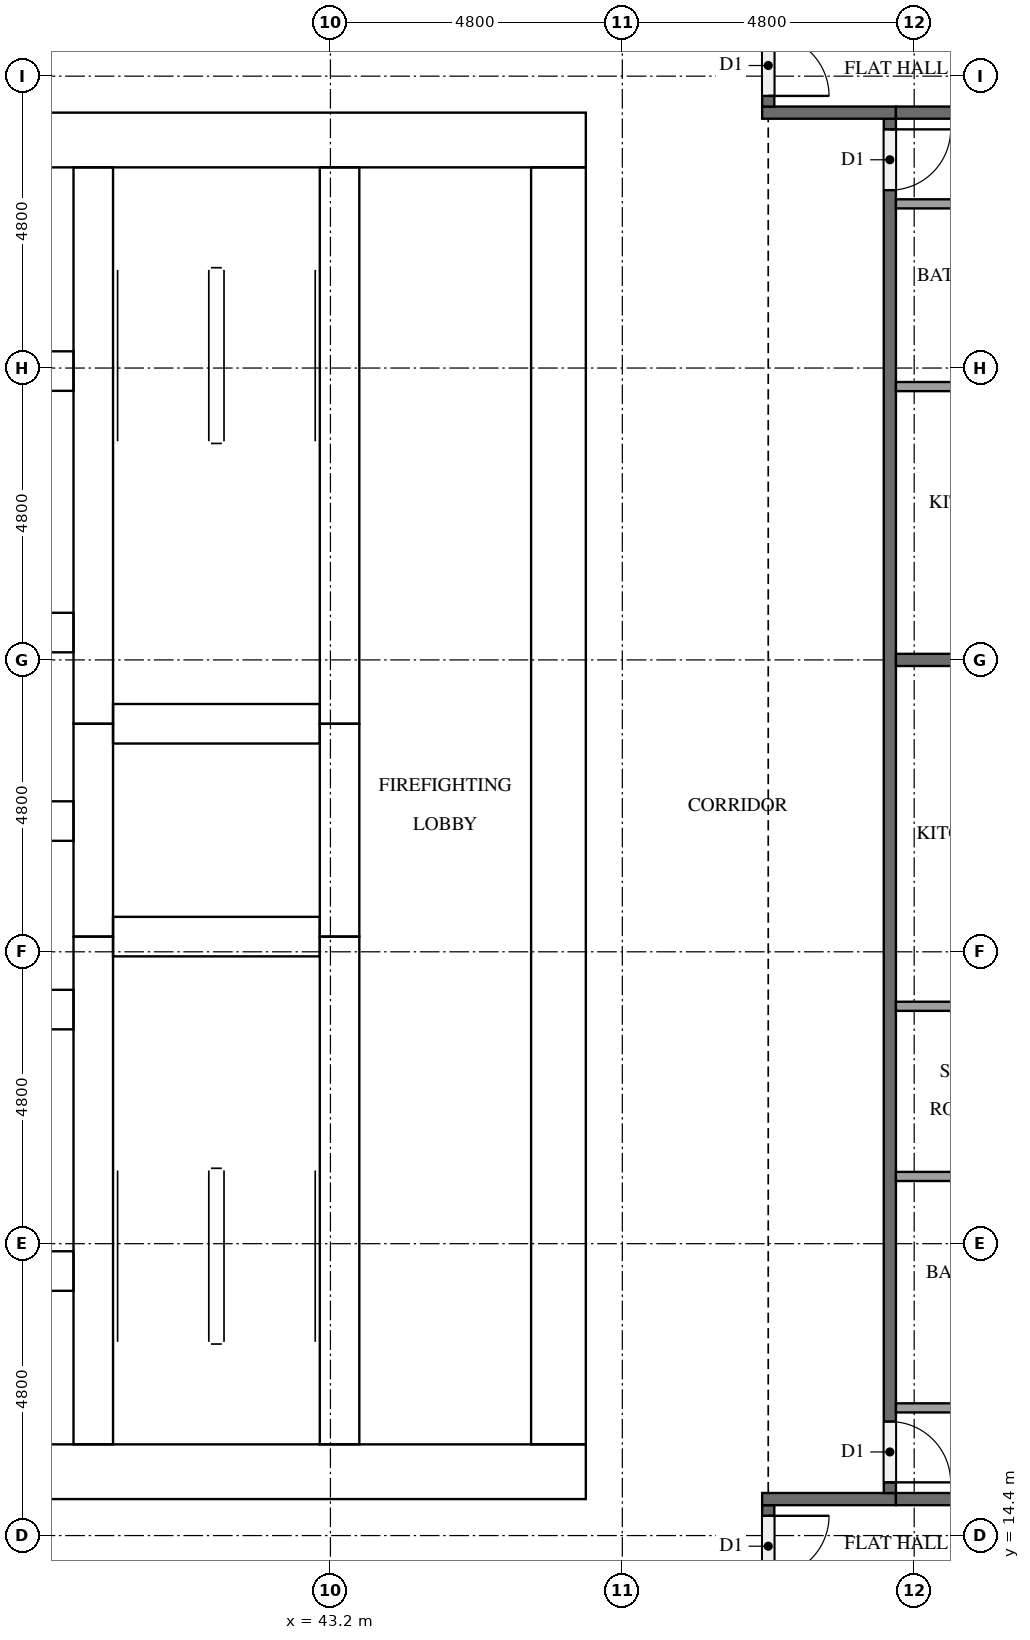
"""IFC4 building model, lengths in metres.
Left out: names, types, materials, properties, quantities, classifications, styles, units other than length and angle.
Written with IfcOpenShell. Run it as: python <this file> out.ifc"""

import sys

from ifc_helpers import new_model, si_unit, direction, frame, frame_2d, origin, place, context, subcontext, project, spatial, rectangle, extrude, element, fill, save


model = new_model("IFC4")
c1 = context("Model", 3, precision=1e-05, world=origin(), true_north=direction((0.0, 1.0)))
c2 = subcontext(c1, "Body", "Model", "MODEL_VIEW")
j1 = project(units=[si_unit("LENGTHUNIT", "METRE"), si_unit("PLANEANGLEUNIT", "RADIAN")], contexts=[c1])
p1 = place(None, origin())
s1 = spatial("IfcSite", under=j1, at=p1, CompositionType="ELEMENT")
p2 = place(p1, origin())
s2 = spatial("IfcBuilding", under=s1, at=p2, CompositionType="ELEMENT")
p3 = place(p2, frame((0.0, 0.0, 89.2)))
s3 = spatial("IfcBuildingStorey", under=s2, at=p3, CompositionType="ELEMENT", Elevation=89.2)
p4 = place(p3, frame((15.0, 15.45, 0.0), z_axis=(0.0, 0.0, 1.0), x_axis=(1.0, 0.0, 0.0)))
e1 = element("IfcWall", 1, at=p4, inside=s3, PredefinedType="SHEAR", context=c2, shape_type="SweptSolid", body=[
    extrude(rectangle(XDim=32.4, YDim=0.9, at=frame_2d((16.2, 0.0))), origin(), (0.0, 0.0, 1.0), 3.2),
])
p5 = place(p4, frame((15.3, 0.0, 0.0)))
e2 = element("IfcOpeningElement", 2, at=p5, cuts=e1, PredefinedType="OPENING", context=c2, shape_type="SweptSolid", body=[
    extrude(rectangle(XDim=1.8, YDim=2.1, at=frame_2d((0.9, 1.05))), frame((0.0, 0.46, 0.0), z_axis=(0.0, -1.0, 0.0), x_axis=(1.0, 0.0, 0.0)), (0.0, 0.0, 1.0), 0.92),
])
p6 = place(p3, frame((15.0, 37.35, 0.0), z_axis=(0.0, 0.0, 1.0), x_axis=(1.0, 0.0, 0.0)))
e3 = element("IfcWall", 3, at=p6, inside=s3, PredefinedType="SHEAR", context=c2, shape_type="SweptSolid", body=[
    extrude(rectangle(XDim=32.4, YDim=0.9, at=frame_2d((16.2, 0.0))), origin(), (0.0, 0.0, 1.0), 3.2),
])
p7 = place(p6, frame((15.3, 0.0, 0.0)))
e4 = element("IfcOpeningElement", 4, at=p7, cuts=e3, PredefinedType="OPENING", context=c2, shape_type="SweptSolid", body=[
    extrude(rectangle(XDim=1.8, YDim=2.1, at=frame_2d((0.9, 1.05))), frame((0.0, 0.46, 0.0), z_axis=(0.0, -1.0, 0.0), x_axis=(1.0, 0.0, 0.0)), (0.0, 0.0, 1.0), 0.92),
])
p8 = place(p6, frame((1.794, 0.0, 0.0)))
e5 = element("IfcOpeningElement", 5, at=p8, cuts=e3, PredefinedType="OPENING", context=c2, shape_type="SweptSolid", body=[
    extrude(rectangle(XDim=1.0, YDim=2.1, at=frame_2d((0.5, 1.05))), frame((0.0, 0.46, 0.0), z_axis=(0.0, -1.0, 0.0), x_axis=(1.0, 0.0, 0.0)), (0.0, 0.0, 1.0), 0.92),
])
p9 = place(p6, frame((5.331, 0.0, 0.0)))
e6 = element("IfcOpeningElement", 6, at=p9, cuts=e3, PredefinedType="OPENING", context=c2, shape_type="SweptSolid", body=[
    extrude(rectangle(XDim=1.0, YDim=2.1, at=frame_2d((0.5, 1.05))), frame((0.0, 0.46, 0.0), z_axis=(0.0, -1.0, 0.0), x_axis=(1.0, 0.0, 0.0)), (0.0, 0.0, 1.0), 0.92),
])
p10 = place(p3, frame((46.95, 15.9, 0.0), z_axis=(0.0, 0.0, 1.0), x_axis=(0.0, 1.0, 0.0)))
e7 = element("IfcWall", 7, at=p10, inside=s3, PredefinedType="SHEAR", context=c2, shape_type="SweptSolid", body=[
    extrude(rectangle(XDim=21.0, YDim=0.9, at=frame_2d((10.5, 0.0))), origin(), (0.0, 0.0, 1.0), 3.2),
])
p11 = place(p10, frame((10.2, 0.0, 0.0)))
e8 = element("IfcOpeningElement", 8, at=p11, cuts=e7, PredefinedType="OPENING", context=c2, shape_type="SweptSolid", body=[
    extrude(rectangle(XDim=1.2, YDim=2.1, at=frame_2d((0.6, 1.05))), frame((0.0, 0.46, 0.0), z_axis=(0.0, -1.0, 0.0), x_axis=(1.0, 0.0, 0.0)), (0.0, 0.0, 1.0), 0.92),
])
p12 = place(p3, frame((39.3, 15.9, 0.0), z_axis=(0.0, 0.0, 1.0), x_axis=(0.0, 1.0, 0.0)))
e9 = element("IfcWall", 9, at=p12, inside=s3, PredefinedType="SHEAR", context=c2, shape_type="SweptSolid", body=[
    extrude(rectangle(XDim=8.35, YDim=0.65, at=frame_2d((4.175, 0.0))), origin(), (0.0, 0.0, 1.0), 3.2),
])
p13 = place(p3, frame((39.3, 24.25, 0.0), z_axis=(0.0, 0.0, 1.0), x_axis=(0.0, 1.0, 0.0)))
e10 = element("IfcWall", 10, at=p13, inside=s3, PredefinedType="SHEAR", context=c2, shape_type="SweptSolid", body=[
    extrude(rectangle(XDim=3.5, YDim=0.65, at=frame_2d((1.75, 0.0))), origin(), (0.0, 0.0, 1.0), 3.2),
])
p14 = place(p3, frame((39.3, 27.75, 0.0), z_axis=(0.0, 0.0, 1.0), x_axis=(0.0, 1.0, 0.0)))
e11 = element("IfcWall", 11, at=p14, inside=s3, PredefinedType="SHEAR", context=c2, shape_type="SweptSolid", body=[
    extrude(rectangle(XDim=9.15, YDim=0.65, at=frame_2d((4.575, 0.0))), origin(), (0.0, 0.0, 1.0), 3.2),
])
p15 = place(p3, frame((43.35, 15.9, 0.0), z_axis=(0.0, 0.0, 1.0), x_axis=(0.0, 1.0, 0.0)))
e12 = element("IfcWall", 12, at=p15, inside=s3, PredefinedType="SHEAR", context=c2, shape_type="SweptSolid", body=[
    extrude(rectangle(XDim=8.35, YDim=0.65, at=frame_2d((4.175, 0.0))), origin(), (0.0, 0.0, 1.0), 3.2),
])
p16 = place(p15, frame((0.3, 0.0, 0.0)))
e13 = element("IfcOpeningElement", 13, at=p16, cuts=e12, PredefinedType="OPENING", context=c2, shape_type="SweptSolid", body=[
    extrude(rectangle(XDim=1.2, YDim=2.1, at=frame_2d((0.6, 1.05))), frame((0.0, 0.335, 0.0), z_axis=(0.0, -1.0, 0.0), x_axis=(1.0, 0.0, 0.0)), (0.0, 0.0, 1.0), 0.67),
])
p17 = place(p3, frame((43.35, 24.25, 0.0), z_axis=(0.0, 0.0, 1.0), x_axis=(0.0, 1.0, 0.0)))
e14 = element("IfcWall", 14, at=p17, inside=s3, PredefinedType="SHEAR", context=c2, shape_type="SweptSolid", body=[
    extrude(rectangle(XDim=3.5, YDim=0.65, at=frame_2d((1.75, 0.0))), origin(), (0.0, 0.0, 1.0), 3.2),
])
p18 = place(p17, frame((1.2, 0.0, 0.0)))
e15 = element("IfcOpeningElement", 15, at=p18, cuts=e14, PredefinedType="OPENING", context=c2, shape_type="SweptSolid", body=[
    extrude(rectangle(XDim=1.1, YDim=2.1, at=frame_2d((0.55, 1.05))), frame((0.0, 0.335, 0.0), z_axis=(0.0, -1.0, 0.0), x_axis=(1.0, 0.0, 0.0)), (0.0, 0.0, 1.0), 0.67),
])
p19 = place(p3, frame((43.35, 27.75, 0.0), z_axis=(0.0, 0.0, 1.0), x_axis=(0.0, 1.0, 0.0)))
e16 = element("IfcWall", 16, at=p19, inside=s3, PredefinedType="SHEAR", context=c2, shape_type="SweptSolid", body=[
    extrude(rectangle(XDim=9.15, YDim=0.65, at=frame_2d((4.575, 0.0))), origin(), (0.0, 0.0, 1.0), 3.2),
])
p20 = place(p19, frame((7.65, 0.0, 0.0)))
e17 = element("IfcOpeningElement", 17, at=p20, cuts=e16, PredefinedType="OPENING", context=c2, shape_type="SweptSolid", body=[
    extrude(rectangle(XDim=1.2, YDim=2.1, at=frame_2d((0.6, 1.05))), frame((0.0, 0.335, 0.0), z_axis=(0.0, -1.0, 0.0), x_axis=(1.0, 0.0, 0.0)), (0.0, 0.0, 1.0), 0.67),
])
for number, where, z_axis, x_axis in (
    (18, (39.625, 24.25, 0.0), (0.0, 0.0, 1.0), (1.0, 0.0, 0.0)),
    (19, (39.625, 27.75, 0.0), (0.0, 0.0, 1.0), (1.0, 0.0, 0.0)),
):
    element("IfcWall", number, at=place(p3, frame(where, z_axis=z_axis, x_axis=x_axis)), inside=s3, PredefinedType="SHEAR", context=c2, shape_type="SweptSolid", body=[
        extrude(rectangle(XDim=3.4, YDim=0.65, at=frame_2d((1.7, 0.0))), origin(), (0.0, 0.0, 1.0), 3.2),
    ])
p21 = place(p3, frame((33.375, 18.75, 0.0), z_axis=(0.0, 0.0, 1.0), x_axis=(1.0, 0.0, 0.0)))
e20 = element("IfcWall", 20, at=p21, inside=s3, PredefinedType="SHEAR", context=c2, shape_type="SweptSolid", body=[
    extrude(rectangle(XDim=5.6, YDim=0.65, at=frame_2d((2.8, 0.0))), origin(), (0.0, 0.0, 1.0), 3.2),
])
p22 = place(p21, frame((1.288, 0.0, 0.0)))
e21 = element("IfcOpeningElement", 21, at=p22, cuts=e20, PredefinedType="OPENING", context=c2, shape_type="SweptSolid", body=[
    extrude(rectangle(XDim=1.1, YDim=2.1, at=frame_2d((0.55, 1.05))), frame((0.0, 0.335, 0.0), z_axis=(0.0, -1.0, 0.0), x_axis=(1.0, 0.0, 0.0)), (0.0, 0.0, 1.0), 0.67),
])
p23 = place(p21, frame((3.863, 0.0, 0.0)))
e22 = element("IfcOpeningElement", 22, at=p23, cuts=e20, PredefinedType="OPENING", context=c2, shape_type="SweptSolid", body=[
    extrude(rectangle(XDim=1.1, YDim=2.1, at=frame_2d((0.55, 1.05))), frame((0.0, 0.335, 0.0), z_axis=(0.0, -1.0, 0.0), x_axis=(1.0, 0.0, 0.0)), (0.0, 0.0, 1.0), 0.67),
])
p24 = place(p3, frame((23.425, 23.05, 0.0), z_axis=(0.0, 0.0, 1.0), x_axis=(1.0, 0.0, 0.0)))
e23 = element("IfcWall", 23, at=p24, inside=s3, PredefinedType="SHEAR", context=c2, shape_type="SweptSolid", body=[
    extrude(rectangle(XDim=15.55, YDim=0.65, at=frame_2d((7.775, 0.0))), origin(), (0.0, 0.0, 1.0), 3.2),
])
p25 = place(p24, frame((0.309, 0.0, 0.0)))
e24 = element("IfcOpeningElement", 24, at=p25, cuts=e23, PredefinedType="OPENING", context=c2, shape_type="SweptSolid", body=[
    extrude(rectangle(XDim=1.0, YDim=2.1, at=frame_2d((0.5, 1.05))), frame((0.0, 0.335, 0.0), z_axis=(0.0, -1.0, 0.0), x_axis=(1.0, 0.0, 0.0)), (0.0, 0.0, 1.0), 0.67),
])
p26 = place(p24, frame((2.934, 0.0, 0.0)))
e25 = element("IfcOpeningElement", 25, at=p26, cuts=e23, PredefinedType="OPENING", context=c2, shape_type="SweptSolid", body=[
    extrude(rectangle(XDim=1.0, YDim=2.1, at=frame_2d((0.5, 1.05))), frame((0.0, 0.335, 0.0), z_axis=(0.0, -1.0, 0.0), x_axis=(1.0, 0.0, 0.0)), (0.0, 0.0, 1.0), 0.67),
])
p27 = place(p24, frame((10.809, 0.0, 0.0)))
e26 = element("IfcOpeningElement", 26, at=p27, cuts=e23, PredefinedType="OPENING", context=c2, shape_type="SweptSolid", body=[
    extrude(rectangle(XDim=1.0, YDim=2.1, at=frame_2d((0.5, 1.05))), frame((0.0, 0.335, 0.0), z_axis=(0.0, -1.0, 0.0), x_axis=(1.0, 0.0, 0.0)), (0.0, 0.0, 1.0), 0.67),
])
p28 = place(p24, frame((13.434, 0.0, 0.0)))
e27 = element("IfcOpeningElement", 27, at=p28, cuts=e23, PredefinedType="OPENING", context=c2, shape_type="SweptSolid", body=[
    extrude(rectangle(XDim=1.0, YDim=2.1, at=frame_2d((0.5, 1.05))), frame((0.0, 0.335, 0.0), z_axis=(0.0, -1.0, 0.0), x_axis=(1.0, 0.0, 0.0)), (0.0, 0.0, 1.0), 0.67),
])
p29 = place(p3, frame((23.425, 26.15, 0.0), z_axis=(0.0, 0.0, 1.0), x_axis=(1.0, 0.0, 0.0)))
e28 = element("IfcWall", 28, at=p29, inside=s3, PredefinedType="SHEAR", context=c2, shape_type="SweptSolid", body=[
    extrude(rectangle(XDim=15.55, YDim=0.65, at=frame_2d((7.775, 0.0))), origin(), (0.0, 0.0, 1.0), 3.2),
])
p30 = place(p3, frame((23.425, 29.25, 0.0), z_axis=(0.0, 0.0, 1.0), x_axis=(1.0, 0.0, 0.0)))
e29 = element("IfcWall", 29, at=p30, inside=s3, PredefinedType="SHEAR", context=c2, shape_type="SweptSolid", body=[
    extrude(rectangle(XDim=15.55, YDim=0.65, at=frame_2d((7.775, 0.0))), origin(), (0.0, 0.0, 1.0), 3.2),
])
p31 = place(p30, frame((2.508, 0.0, 0.0)))
e30 = element("IfcOpeningElement", 30, at=p31, cuts=e29, PredefinedType="OPENING", context=c2, shape_type="SweptSolid", body=[
    extrude(rectangle(XDim=1.0, YDim=2.1, at=frame_2d((0.5, 1.05))), frame((0.0, 0.335, 0.0), z_axis=(0.0, -1.0, 0.0), x_axis=(1.0, 0.0, 0.0)), (0.0, 0.0, 1.0), 0.67),
])
p32 = place(p30, frame((7.275, 0.0, 0.0)))
e31 = element("IfcOpeningElement", 31, at=p32, cuts=e29, PredefinedType="OPENING", context=c2, shape_type="SweptSolid", body=[
    extrude(rectangle(XDim=1.0, YDim=2.1, at=frame_2d((0.5, 1.05))), frame((0.0, 0.335, 0.0), z_axis=(0.0, -1.0, 0.0), x_axis=(1.0, 0.0, 0.0)), (0.0, 0.0, 1.0), 0.67),
])
p33 = place(p30, frame((12.042, 0.0, 0.0)))
e32 = element("IfcOpeningElement", 32, at=p33, cuts=e29, PredefinedType="OPENING", context=c2, shape_type="SweptSolid", body=[
    extrude(rectangle(XDim=1.0, YDim=2.1, at=frame_2d((0.5, 1.05))), frame((0.0, 0.335, 0.0), z_axis=(0.0, -1.0, 0.0), x_axis=(1.0, 0.0, 0.0)), (0.0, 0.0, 1.0), 0.67),
])
p34 = place(p3, frame((33.375, 33.55, 0.0), z_axis=(0.0, 0.0, 1.0), x_axis=(1.0, 0.0, 0.0)))
e33 = element("IfcWall", 33, at=p34, inside=s3, PredefinedType="SHEAR", context=c2, shape_type="SweptSolid", body=[
    extrude(rectangle(XDim=5.6, YDim=0.65, at=frame_2d((2.8, 0.0))), origin(), (0.0, 0.0, 1.0), 3.2),
])
p35 = place(p3, frame((50.4, 14.9, 0.0), z_axis=(0.0, 0.0, 1.0), x_axis=(0.0, -1.0, 0.0)))
e34 = element("IfcWall", 34, at=p35, inside=s3, PredefinedType="PARTITIONING", context=c2, shape_type="SweptSolid", body=[
    extrude(rectangle(XDim=2.8, YDim=0.2, at=frame_2d((1.4, 0.0))), origin(), (0.0, 0.0, 1.0), 3.2),
])
p36 = place(p35, frame((0.175, 0.0, 0.0)))
e35 = element("IfcOpeningElement", 35, at=p36, cuts=e34, PredefinedType="OPENING", context=c2, shape_type="SweptSolid", body=[
    extrude(rectangle(XDim=1.0, YDim=2.1, at=frame_2d((0.5, 1.05))), frame((0.0, 0.11, 0.0), z_axis=(0.0, -1.0, 0.0), x_axis=(1.0, 0.0, 0.0)), (0.0, 0.0, 1.0), 0.22),
])
p37 = place(p3, frame((50.3, 15.0, 0.0), z_axis=(0.0, 0.0, 1.0), x_axis=(1.0, 0.0, 0.0)))
e36 = element("IfcWall", 36, at=p37, inside=s3, PredefinedType="PARTITIONING", context=c2, shape_type="SweptSolid", body=[
    extrude(rectangle(XDim=2.2, YDim=0.2, at=frame_2d((1.1, 0.0))), origin(), (0.0, 0.0, 1.0), 3.2),
])
p38 = place(p3, frame((52.4, 37.7, 0.0), z_axis=(0.0, 0.0, 1.0), x_axis=(0.0, -1.0, 0.0)))
e37 = element("IfcWall", 37, at=p38, inside=s3, PredefinedType="PARTITIONING", context=c2, shape_type="SweptSolid", body=[
    extrude(rectangle(XDim=22.6, YDim=0.2, at=frame_2d((11.3, 0.0))), origin(), (0.0, 0.0, 1.0), 3.2),
])
p39 = place(p38, frame((21.425, 0.0, 0.0)))
e38 = element("IfcOpeningElement", 38, at=p39, cuts=e37, PredefinedType="OPENING", context=c2, shape_type="SweptSolid", body=[
    extrude(rectangle(XDim=1.0, YDim=2.1, at=frame_2d((0.5, 1.05))), frame((0.0, 0.11, 0.0), z_axis=(0.0, -1.0, 0.0), x_axis=(1.0, 0.0, 0.0)), (0.0, 0.0, 1.0), 0.22),
])
p40 = place(p38, frame((0.175, 0.0, 0.0)))
e39 = element("IfcOpeningElement", 39, at=p40, cuts=e37, PredefinedType="OPENING", context=c2, shape_type="SweptSolid", body=[
    extrude(rectangle(XDim=1.0, YDim=2.1, at=frame_2d((0.5, 1.05))), frame((0.0, 0.11, 0.0), z_axis=(0.0, -1.0, 0.0), x_axis=(1.0, 0.0, 0.0)), (0.0, 0.0, 1.0), 0.22),
])
p41 = place(p3, frame((52.5, 37.8, 0.0), z_axis=(0.0, 0.0, 1.0), x_axis=(-1.0, 0.0, 0.0)))
e40 = element("IfcWall", 40, at=p41, inside=s3, PredefinedType="PARTITIONING", context=c2, shape_type="SweptSolid", body=[
    extrude(rectangle(XDim=2.2, YDim=0.2, at=frame_2d((1.1, 0.0))), origin(), (0.0, 0.0, 1.0), 3.2),
])
p42 = place(p3, frame((50.4, 40.7, 0.0), z_axis=(0.0, 0.0, 1.0), x_axis=(0.0, -1.0, 0.0)))
e41 = element("IfcWall", 41, at=p42, inside=s3, PredefinedType="PARTITIONING", context=c2, shape_type="SweptSolid", body=[
    extrude(rectangle(XDim=2.8, YDim=0.2, at=frame_2d((1.4, 0.0))), origin(), (0.0, 0.0, 1.0), 3.2),
])
p43 = place(p42, frame((1.625, 0.0, 0.0)))
e42 = element("IfcOpeningElement", 42, at=p43, cuts=e41, PredefinedType="OPENING", context=c2, shape_type="SweptSolid", body=[
    extrude(rectangle(XDim=1.0, YDim=2.1, at=frame_2d((0.5, 1.05))), frame((0.0, 0.11, 0.0), z_axis=(0.0, -1.0, 0.0), x_axis=(1.0, 0.0, 0.0)), (0.0, 0.0, 1.0), 0.22),
])
p44 = place(p3, frame((52.5, 15.0, 0.0), z_axis=(0.0, 0.0, 1.0), x_axis=(1.0, 0.0, 0.0)))
e43 = element("IfcWall", 43, at=p44, inside=s3, PredefinedType="PARTITIONING", context=c2, shape_type="SweptSolid", body=[
    extrude(rectangle(XDim=9.8, YDim=0.2, at=frame_2d((4.9, 0.0))), origin(), (0.0, 0.0, 1.0), 3.2),
])
for number, where, z_axis, x_axis in (
    (44, (52.5, 28.8, 0.0), (0.0, 0.0, 1.0), (1.0, 0.0, 0.0)),
    (45, (52.5, 37.8, 0.0), (0.0, 0.0, 1.0), (1.0, 0.0, 0.0)),
):
    element("IfcWall", number, at=place(p3, frame(where, z_axis=z_axis, x_axis=x_axis)), inside=s3, PredefinedType="PARTITIONING", context=c2, shape_type="SweptSolid", body=[
        extrude(rectangle(XDim=9.475, YDim=0.2, at=frame_2d((4.738, 0.0))), origin(), (0.0, 0.0, 1.0), 3.2),
    ])
for number, where, z_axis, x_axis in (
    (46, (52.5, 20.306, 0.0), (0.0, 0.0, 1.0), (1.0, 0.0, 0.0)),
    (47, (52.5, 23.104, 0.0), (0.0, 0.0, 1.0), (1.0, 0.0, 0.0)),
):
    element("IfcWall", number, at=place(p3, frame(where, z_axis=z_axis, x_axis=x_axis)), inside=s3, PredefinedType="PARTITIONING", context=c2, shape_type="SweptSolid", body=[
        extrude(rectangle(XDim=2.775, YDim=0.15, at=frame_2d((1.387, 0.0))), origin(), (0.0, 0.0, 1.0), 3.2),
    ])
p45 = place(p3, frame((52.5, 16.5, 0.0), z_axis=(0.0, 0.0, 1.0), x_axis=(1.0, 0.0, 0.0)))
e48 = element("IfcWall", 48, at=p45, inside=s3, PredefinedType="PARTITIONING", context=c2, shape_type="SweptSolid", body=[
    extrude(rectangle(XDim=2.925, YDim=0.15, at=frame_2d((1.462, 0.0))), origin(), (0.0, 0.0, 1.0), 3.2),
])
p46 = place(p3, frame((52.5, 33.295, 0.0), z_axis=(0.0, 0.0, 1.0), x_axis=(1.0, 0.0, 0.0)))
e49 = element("IfcWall", 49, at=p46, inside=s3, PredefinedType="PARTITIONING", context=c2, shape_type="SweptSolid", body=[
    extrude(rectangle(XDim=2.475, YDim=0.15, at=frame_2d((1.238, 0.0))), origin(), (0.0, 0.0, 1.0), 3.2),
])
p47 = place(p3, frame((52.5, 36.3, 0.0), z_axis=(0.0, 0.0, 1.0), x_axis=(1.0, 0.0, 0.0)))
e50 = element("IfcWall", 50, at=p47, inside=s3, PredefinedType="PARTITIONING", context=c2, shape_type="SweptSolid", body=[
    extrude(rectangle(XDim=2.625, YDim=0.15, at=frame_2d((1.312, 0.0))), origin(), (0.0, 0.0, 1.0), 3.2),
])
p48 = place(p18, origin())
e51 = element("IfcDoor", 51, at=p48, inside=s3, OperationType="DOUBLE_DOOR_SLIDING", PredefinedType="DOOR", context=c2, shape_type="SweptSolid", body=[
    extrude(rectangle(XDim=1.1, YDim=2.1, at=frame_2d((0.55, 1.05))), frame((0.0, 0.025, 0.0), z_axis=(0.0, -1.0, 0.0), x_axis=(1.0, 0.0, 0.0)), (0.0, 0.0, 1.0), 0.05),
])
fill(e15, e51)
p49 = place(p16, origin())
e52 = element("IfcDoor", 52, at=p49, inside=s3, OperationType="SINGLE_SWING_LEFT", PredefinedType="DOOR", context=c2, shape_type="SweptSolid", body=[
    extrude(rectangle(XDim=1.2, YDim=2.1, at=frame_2d((0.6, 1.05))), frame((0.0, 0.025, 0.0), z_axis=(0.0, -1.0, 0.0), x_axis=(1.0, 0.0, 0.0)), (0.0, 0.0, 1.0), 0.05),
])
fill(e13, e52)
p50 = place(p20, origin())
e53 = element("IfcDoor", 53, at=p50, inside=s3, OperationType="SINGLE_SWING_RIGHT", PredefinedType="DOOR", context=c2, shape_type="SweptSolid", body=[
    extrude(rectangle(XDim=1.2, YDim=2.1, at=frame_2d((0.6, 1.05))), frame((0.0, 0.025, 0.0), z_axis=(0.0, -1.0, 0.0), x_axis=(1.0, 0.0, 0.0)), (0.0, 0.0, 1.0), 0.05),
])
fill(e17, e53)
p51 = place(p11, origin())
e54 = element("IfcDoor", 54, at=p51, inside=s3, OperationType="SINGLE_SWING_RIGHT", PredefinedType="DOOR", context=c2, shape_type="SweptSolid", body=[
    extrude(rectangle(XDim=1.2, YDim=2.1, at=frame_2d((0.6, 1.05))), frame((0.0, 0.025, 0.0), z_axis=(0.0, -1.0, 0.0), x_axis=(1.0, 0.0, 0.0)), (0.0, 0.0, 1.0), 0.05),
])
fill(e8, e54)
p52 = place(p36, origin())
e55 = element("IfcDoor", 55, at=p52, inside=s3, OperationType="SINGLE_SWING_LEFT", PredefinedType="DOOR", context=c2, shape_type="SweptSolid", body=[
    extrude(rectangle(XDim=1.0, YDim=2.1, at=frame_2d((0.5, 1.05))), frame((0.0, 0.025, 0.0), z_axis=(0.0, -1.0, 0.0), x_axis=(1.0, 0.0, 0.0)), (0.0, 0.0, 1.0), 0.05),
])
fill(e35, e55)
p53 = place(p39, origin())
e56 = element("IfcDoor", 56, at=p53, inside=s3, OperationType="SINGLE_SWING_RIGHT", PredefinedType="DOOR", context=c2, shape_type="SweptSolid", body=[
    extrude(rectangle(XDim=1.0, YDim=2.1, at=frame_2d((0.5, 1.05))), frame((0.0, 0.025, 0.0), z_axis=(0.0, -1.0, 0.0), x_axis=(1.0, 0.0, 0.0)), (0.0, 0.0, 1.0), 0.05),
])
fill(e38, e56)
p54 = place(p40, origin())
e57 = element("IfcDoor", 57, at=p54, inside=s3, OperationType="SINGLE_SWING_LEFT", PredefinedType="DOOR", context=c2, shape_type="SweptSolid", body=[
    extrude(rectangle(XDim=1.0, YDim=2.1, at=frame_2d((0.5, 1.05))), frame((0.0, 0.025, 0.0), z_axis=(0.0, -1.0, 0.0), x_axis=(1.0, 0.0, 0.0)), (0.0, 0.0, 1.0), 0.05),
])
fill(e39, e57)
p55 = place(p43, origin())
e58 = element("IfcDoor", 58, at=p55, inside=s3, OperationType="SINGLE_SWING_RIGHT", PredefinedType="DOOR", context=c2, shape_type="SweptSolid", body=[
    extrude(rectangle(XDim=1.0, YDim=2.1, at=frame_2d((0.5, 1.05))), frame((0.0, 0.025, 0.0), z_axis=(0.0, -1.0, 0.0), x_axis=(1.0, 0.0, 0.0)), (0.0, 0.0, 1.0), 0.05),
])
fill(e42, e58)
save(model, sys.argv[1])
